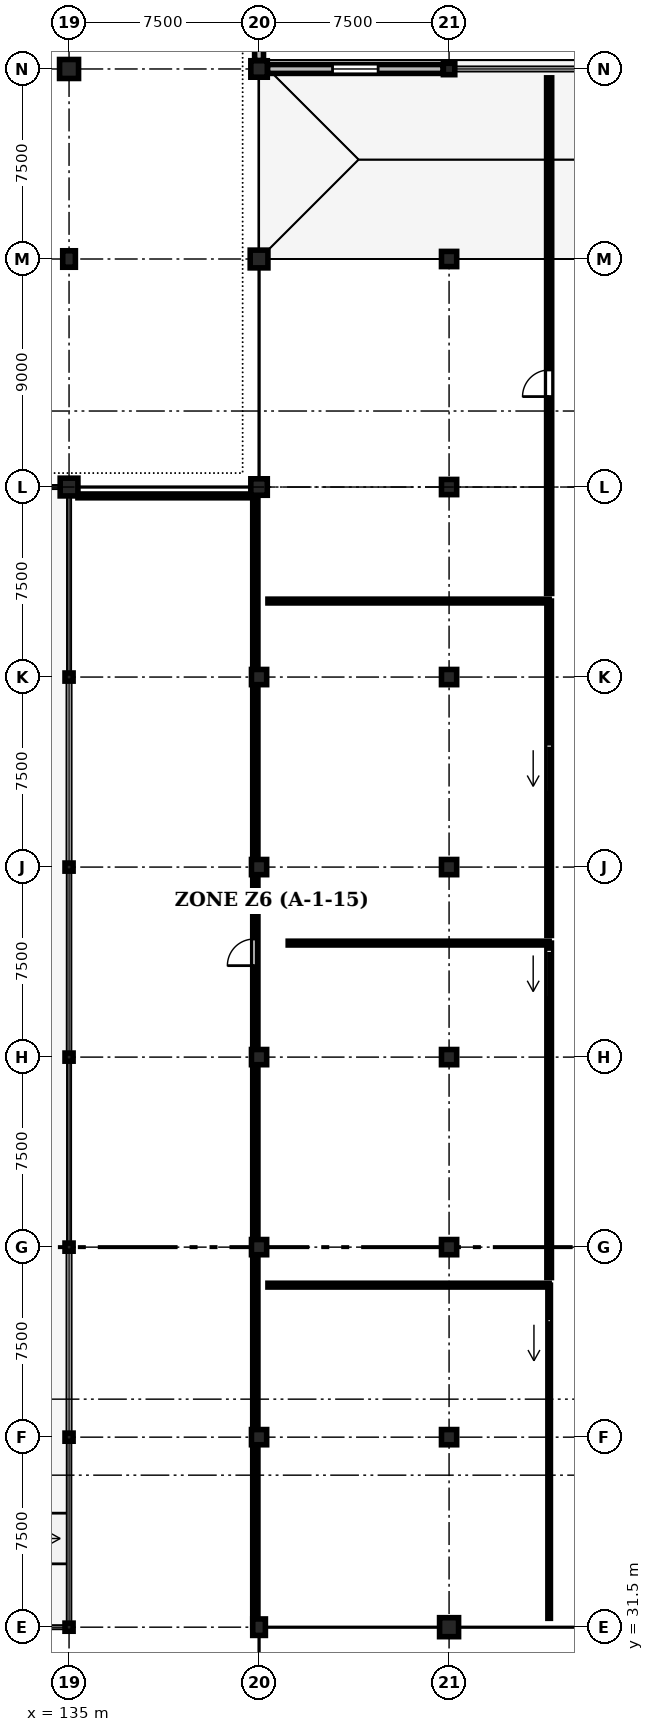
"""IFC4 building model, lengths in metres.
Left out: names, types, materials, properties, quantities, classifications, styles, units other than length and angle.
Written with IfcOpenShell. Run it as: python <this file> out.ifc"""

import sys

from ifc_helpers import new_model, si_unit, direction, frame, frame_2d, origin, origin_2d, place, context, subcontext, project, spatial, rectangle, circle, extrude, element, fill, save


model = new_model("IFC4")
c1 = context("Model", 3, precision=1e-05, world=origin(), true_north=direction((0.0, 1.0)))
c2 = subcontext(c1, "Body", "Model", "MODEL_VIEW")
j1 = project(units=[si_unit("LENGTHUNIT", "METRE"), si_unit("PLANEANGLEUNIT", "RADIAN")], contexts=[c1])
p1 = place(None, origin())
s1 = spatial("IfcSite", under=j1, at=p1, CompositionType="ELEMENT")
p2 = place(p1, origin())
s2 = spatial("IfcBuilding", under=s1, at=p2, CompositionType="ELEMENT")
p3 = place(p2, origin())
s3 = spatial("IfcBuildingStorey", under=s2, at=p3, CompositionType="ELEMENT", Elevation=0.0)
for number, where, z_axis, x_axis in (
    (1, (135.0, 31.5, 0.0), (0.0, 0.0, 1.0), (1.0, 0.0, 0.0)),
    (2, (135.0, 39.0, 0.0), (0.0, 0.0, 1.0), (1.0, 0.0, 0.0)),
    (3, (135.0, 46.5, 0.0), (0.0, 0.0, 1.0), (1.0, 0.0, 0.0)),
    (4, (135.0, 54.0, 0.0), (0.0, 0.0, 1.0), (1.0, 0.0, 0.0)),
    (5, (135.0, 61.5, 0.0), (0.0, 0.0, 1.0), (1.0, 0.0, 0.0)),
    (6, (135.0, 69.0, 0.0), (0.0, 0.0, 1.0), (1.0, 0.0, 0.0)),
):
    element("IfcColumn", number, at=place(p3, frame(where, z_axis=z_axis, x_axis=x_axis)), inside=s3, PredefinedType="COLUMN", context=c2, shape_type="SweptSolid", body=[
        extrude(rectangle(XDim=0.32, YDim=0.32, at=origin_2d()), origin(), (0.0, 0.0, 1.0), 4.8),
    ])
p4 = place(p3, frame((135.0, 76.5, 0.0), z_axis=(0.0, 0.0, 1.0), x_axis=(1.0, 0.0, 0.0)))
e7 = element("IfcColumn", 7, at=p4, inside=s3, PredefinedType="COLUMN", context=c2, shape_type="SweptSolid", body=[
    extrude(rectangle(XDim=0.7, YDim=0.7, at=origin_2d()), origin(), (0.0, 0.0, 1.0), 4.8),
])
p5 = place(p3, frame((135.0, 85.5, 0.0), z_axis=(0.0, 0.0, 1.0), x_axis=(1.0, 0.0, 0.0)))
e8 = element("IfcColumn", 8, at=p5, inside=s3, PredefinedType="COLUMN", context=c2, shape_type="SweptSolid", body=[
    extrude(rectangle(XDim=0.5, YDim=0.65, at=origin_2d()), origin(), (0.0, 0.0, 1.0), 4.8),
])
p6 = place(p3, frame((135.0, 93.0, 0.0), z_axis=(0.0, 0.0, 1.0), x_axis=(1.0, 0.0, 0.0)))
e9 = element("IfcColumn", 9, at=p6, inside=s3, PredefinedType="COLUMN", context=c2, shape_type="SweptSolid", body=[
    extrude(rectangle(XDim=0.75, YDim=0.75, at=origin_2d()), origin(), (0.0, 0.0, 1.0), 4.8),
])
p7 = place(p3, frame((142.5, 31.5, 0.0), z_axis=(0.0, 0.0, 1.0), x_axis=(1.0, 0.0, 0.0)))
e10 = element("IfcColumn", 10, at=p7, inside=s3, PredefinedType="COLUMN", context=c2, shape_type="SweptSolid", body=[
    extrude(rectangle(XDim=0.5, YDim=0.65, at=origin_2d()), origin(), (0.0, 0.0, 1.0), 4.8),
])
p8 = place(p3, frame((142.5, 39.0, 0.0), z_axis=(0.0, 0.0, 1.0), x_axis=(1.0, 0.0, 0.0)))
e11 = element("IfcColumn", 11, at=p8, inside=s3, PredefinedType="COLUMN", context=c2, shape_type="SweptSolid", body=[
    extrude(circle(Radius=0.3, at=origin_2d()), origin(), (0.0, 0.0, 1.0), 4.8),
])
for number, where, z_axis, x_axis in (
    (12, (142.5, 46.5, 0.0), (0.0, 0.0, 1.0), (1.0, 0.0, 0.0)),
    (13, (142.5, 54.0, 0.0), (0.0, 0.0, 1.0), (1.0, 0.0, 0.0)),
):
    element("IfcColumn", number, at=place(p3, frame(where, z_axis=z_axis, x_axis=x_axis)), inside=s3, PredefinedType="COLUMN", context=c2, shape_type="SweptSolid", body=[
        extrude(rectangle(XDim=0.6, YDim=0.6, at=origin_2d()), origin(), (0.0, 0.0, 1.0), 4.8),
    ])
p9 = place(p3, frame((142.5, 61.5, 0.0), z_axis=(0.0, 0.0, 1.0), x_axis=(1.0, 0.0, 0.0)))
e14 = element("IfcColumn", 14, at=p9, inside=s3, PredefinedType="COLUMN", context=c2, shape_type="SweptSolid", body=[
    extrude(circle(Radius=0.3, at=origin_2d()), origin(), (0.0, 0.0, 1.0), 4.8),
])
p10 = place(p3, frame((142.5, 69.0, 0.0), z_axis=(0.0, 0.0, 1.0), x_axis=(1.0, 0.0, 0.0)))
e15 = element("IfcColumn", 15, at=p10, inside=s3, PredefinedType="COLUMN", context=c2, shape_type="SweptSolid", body=[
    extrude(rectangle(XDim=0.6, YDim=0.6, at=origin_2d()), origin(), (0.0, 0.0, 1.0), 4.8),
])
p11 = place(p3, frame((142.5, 76.5, 0.0), z_axis=(0.0, 0.0, 1.0), x_axis=(1.0, 0.0, 0.0)))
e16 = element("IfcColumn", 16, at=p11, inside=s3, PredefinedType="COLUMN", context=c2, shape_type="SweptSolid", body=[
    extrude(rectangle(XDim=0.65, YDim=0.65, at=origin_2d()), origin(), (0.0, 0.0, 1.0), 4.8),
])
p12 = place(p3, frame((142.5, 85.5, 0.0), z_axis=(0.0, 0.0, 1.0), x_axis=(1.0, 0.0, 0.0)))
e17 = element("IfcColumn", 17, at=p12, inside=s3, PredefinedType="COLUMN", context=c2, shape_type="SweptSolid", body=[
    extrude(rectangle(XDim=0.7, YDim=0.7, at=origin_2d()), origin(), (0.0, 0.0, 1.0), 4.8),
])
p13 = place(p3, frame((142.5, 93.0, 0.0), z_axis=(0.0, 0.0, 1.0), x_axis=(1.0, 0.0, 0.0)))
e18 = element("IfcColumn", 18, at=p13, inside=s3, PredefinedType="COLUMN", context=c2, shape_type="SweptSolid", body=[
    extrude(rectangle(XDim=0.65, YDim=0.65, at=origin_2d()), origin(), (0.0, 0.0, 1.0), 4.8),
])
p14 = place(p3, frame((150.0, 31.5, 0.0), z_axis=(0.0, 0.0, 1.0), x_axis=(1.0, 0.0, 0.0)))
e19 = element("IfcColumn", 19, at=p14, inside=s3, PredefinedType="COLUMN", context=c2, shape_type="SweptSolid", body=[
    extrude(rectangle(XDim=0.75, YDim=0.75, at=origin_2d()), origin(), (0.0, 0.0, 1.0), 4.8),
])
for number, where, z_axis, x_axis in (
    (20, (150.0, 39.0, 0.0), (0.0, 0.0, 1.0), (1.0, 0.0, 0.0)),
    (21, (150.0, 46.5, 0.0), (0.0, 0.0, 1.0), (1.0, 0.0, 0.0)),
):
    element("IfcColumn", number, at=place(p3, frame(where, z_axis=z_axis, x_axis=x_axis)), inside=s3, PredefinedType="COLUMN", context=c2, shape_type="SweptSolid", body=[
        extrude(rectangle(XDim=0.6, YDim=0.6, at=origin_2d()), origin(), (0.0, 0.0, 1.0), 4.8),
    ])
p15 = place(p3, frame((150.0, 54.0, 0.0), z_axis=(0.0, 0.0, 1.0), x_axis=(1.0, 0.0, 0.0)))
e22 = element("IfcColumn", 22, at=p15, inside=s3, PredefinedType="COLUMN", context=c2, shape_type="SweptSolid", body=[
    extrude(circle(Radius=0.3, at=origin_2d()), origin(), (0.0, 0.0, 1.0), 4.8),
])
for number, where, z_axis, x_axis in (
    (23, (150.0, 61.5, 0.0), (0.0, 0.0, 1.0), (1.0, 0.0, 0.0)),
    (24, (150.0, 69.0, 0.0), (0.0, 0.0, 1.0), (1.0, 0.0, 0.0)),
):
    element("IfcColumn", number, at=place(p3, frame(where, z_axis=z_axis, x_axis=x_axis)), inside=s3, PredefinedType="COLUMN", context=c2, shape_type="SweptSolid", body=[
        extrude(rectangle(XDim=0.6, YDim=0.6, at=origin_2d()), origin(), (0.0, 0.0, 1.0), 4.8),
    ])
p16 = place(p3, frame((150.0, 76.5, 0.0), z_axis=(0.0, 0.0, 1.0), x_axis=(1.0, 0.0, 0.0)))
e25 = element("IfcColumn", 25, at=p16, inside=s3, PredefinedType="COLUMN", context=c2, shape_type="SweptSolid", body=[
    extrude(circle(Radius=0.3, at=origin_2d()), origin(), (0.0, 0.0, 1.0), 4.8),
])
p17 = place(p3, frame((150.0, 85.5, 0.0), z_axis=(0.0, 0.0, 1.0), x_axis=(1.0, 0.0, 0.0)))
e26 = element("IfcColumn", 26, at=p17, inside=s3, PredefinedType="COLUMN", context=c2, shape_type="SweptSolid", body=[
    extrude(rectangle(XDim=0.6, YDim=0.6, at=origin_2d()), origin(), (0.0, 0.0, 1.0), 4.8),
])
p18 = place(p3, frame((150.0, 93.0, 0.0), z_axis=(0.0, 0.0, 1.0), x_axis=(1.0, 0.0, 0.0)))
e27 = element("IfcColumn", 27, at=p18, inside=s3, PredefinedType="COLUMN", context=c2, shape_type="SweptSolid", body=[
    extrude(rectangle(XDim=0.45, YDim=0.45, at=origin_2d()), origin(), (0.0, 0.0, 1.0), 4.8),
])
p19 = place(p3, frame((142.5, 100.14, 0.0), z_axis=(0.0, 0.0, 1.0), x_axis=(0.0, -1.0, 0.0)))
e28 = element("IfcWall", 28, at=p19, inside=s3, PredefinedType="STANDARD", context=c2, shape_type="SweptSolid", body=[
    extrude(rectangle(XDim=6.805, YDim=0.35, at=frame_2d((3.402, 0.0))), origin(), (0.0, 0.0, 1.0), 3.9),
])
p20 = place(p19, frame((2.502, 0.0, 0.9)))
e29 = element("IfcOpeningElement", 29, at=p20, cuts=e28, PredefinedType="OPENING", context=c2, shape_type="SweptSolid", body=[
    extrude(rectangle(XDim=1.8, YDim=1.8, at=frame_2d((0.9, 0.9))), frame((0.0, 0.185, 0.0), z_axis=(0.0, -1.0, 0.0), x_axis=(1.0, 0.0, 0.0)), (0.0, 0.0, 1.0), 0.37),
])
p21 = place(p3, frame((142.835, 93.0, 0.0), z_axis=(0.0, 0.0, 1.0), x_axis=(1.0, 0.0, 0.0)))
e30 = element("IfcWall", 30, at=p21, inside=s3, PredefinedType="STANDARD", context=c2, shape_type="SweptSolid", body=[
    extrude(rectangle(XDim=6.93, YDim=0.35, at=frame_2d((3.465, 0.0))), origin(), (0.0, 0.0, 1.0), 4.5),
])
p22 = place(p21, frame((2.565, 0.0, 0.9)))
e31 = element("IfcOpeningElement", 31, at=p22, cuts=e30, PredefinedType="OPENING", context=c2, shape_type="SweptSolid", body=[
    extrude(rectangle(XDim=1.8, YDim=1.8, at=frame_2d((0.9, 0.9))), frame((0.0, 0.185, 0.0), z_axis=(0.0, -1.0, 0.0), x_axis=(1.0, 0.0, 0.0)), (0.0, 0.0, 1.0), 0.37),
])
p23 = place(p3, frame((142.3, 31.5, 0.0), z_axis=(0.0, 0.0, 1.0), x_axis=(0.0, 1.0, 0.0)))
e32 = element("IfcWall", 32, at=p23, inside=s3, PredefinedType="PARTITIONING", context=c2, shape_type="SweptSolid", body=[
    extrude(rectangle(XDim=44.65, YDim=0.1, at=frame_2d((22.325, 0.0))), origin(), (0.0, 0.0, 1.0), 3.935),
])
p24 = place(p23, frame((26.11, 0.0, 0.0)))
e33 = element("IfcOpeningElement", 33, at=p24, cuts=e32, PredefinedType="OPENING", context=c2, shape_type="SweptSolid", body=[
    extrude(rectangle(XDim=1.05, YDim=2.2, at=frame_2d((0.525, 1.1))), frame((0.0, 0.06, 0.0), z_axis=(0.0, -1.0, 0.0), x_axis=(1.0, 0.0, 0.0)), (0.0, 0.0, 1.0), 0.12),
])
p25 = place(p3, frame((153.95, 31.85, 0.0), z_axis=(0.0, 0.0, 1.0), x_axis=(0.0, 1.0, 0.0)))
e34 = element("IfcWall", 34, at=p25, inside=s3, PredefinedType="PARTITIONING", context=c2, shape_type="SweptSolid", body=[
    extrude(rectangle(XDim=13.15, YDim=0.1, at=frame_2d((6.575, 0.0))), origin(), (0.0, 0.0, 1.0), 4.485),
])
p26 = place(p25, frame((9.925, 0.0, 0.0)))
e35 = element("IfcOpeningElement", 35, at=p26, cuts=e34, PredefinedType="OPENING", context=c2, shape_type="SweptSolid", body=[
    extrude(rectangle(XDim=1.9, YDim=2.45, at=frame_2d((0.95, 1.225))), frame((0.0, 0.06, 0.0), z_axis=(0.0, -1.0, 0.0), x_axis=(1.0, 0.0, 0.0)), (0.0, 0.0, 1.0), 0.12),
])
p27 = place(p3, frame((153.95, 45.3, 0.0), z_axis=(0.0, 0.0, 1.0), x_axis=(0.0, 1.0, 0.0)))
e36 = element("IfcWall", 36, at=p27, inside=s3, PredefinedType="PARTITIONING", context=c2, shape_type="SweptSolid", body=[
    extrude(rectangle(XDim=13.2, YDim=0.18, at=frame_2d((6.6, 0.0))), origin(), (0.0, 0.0, 1.0), 4.485),
])
p28 = place(p27, frame((11.05, 0.0, 0.0)))
e37 = element("IfcOpeningElement", 37, at=p28, cuts=e36, PredefinedType="OPENING", context=c2, shape_type="SweptSolid", body=[
    extrude(rectangle(XDim=1.9, YDim=2.45, at=frame_2d((0.95, 1.225))), frame((0.0, 0.1, 0.0), z_axis=(0.0, -1.0, 0.0), x_axis=(1.0, 0.0, 0.0)), (0.0, 0.0, 1.0), 0.2),
])
p29 = place(p3, frame((153.95, 58.8, 0.0), z_axis=(0.0, 0.0, 1.0), x_axis=(0.0, 1.0, 0.0)))
e38 = element("IfcWall", 38, at=p29, inside=s3, PredefinedType="PARTITIONING", context=c2, shape_type="SweptSolid", body=[
    extrude(rectangle(XDim=13.2, YDim=0.18, at=frame_2d((6.6, 0.0))), origin(), (0.0, 0.0, 1.0), 4.485),
])
p30 = place(p29, frame((5.65, 0.0, 0.0)))
e39 = element("IfcOpeningElement", 39, at=p30, cuts=e38, PredefinedType="OPENING", context=c2, shape_type="SweptSolid", body=[
    extrude(rectangle(XDim=1.9, YDim=2.45, at=frame_2d((0.95, 1.225))), frame((0.0, 0.1, 0.0), z_axis=(0.0, -1.0, 0.0), x_axis=(1.0, 0.0, 0.0)), (0.0, 0.0, 1.0), 0.2),
])
p31 = place(p3, frame((153.95, 72.3, 0.0), z_axis=(0.0, 0.0, 1.0), x_axis=(0.0, 1.0, 0.0)))
e40 = element("IfcWall", 40, at=p31, inside=s3, PredefinedType="STANDARD", context=c2, shape_type="SweptSolid", body=[
    extrude(rectangle(XDim=20.35, YDim=0.2, at=frame_2d((10.175, 0.0))), origin(), (0.0, 0.0, 1.0), 4.085),
])
p32 = place(p31, frame((7.77, 0.0, 0.0)))
e41 = element("IfcOpeningElement", 41, at=p32, cuts=e40, PredefinedType="OPENING", context=c2, shape_type="SweptSolid", body=[
    extrude(rectangle(XDim=1.05, YDim=2.2, at=frame_2d((0.525, 1.1))), frame((0.0, 0.11, 0.0), z_axis=(0.0, -1.0, 0.0), x_axis=(1.0, 0.0, 0.0)), (0.0, 0.0, 1.0), 0.22),
])
p33 = place(p3, frame((135.35, 76.15, 0.0), z_axis=(0.0, 0.0, 1.0), x_axis=(1.0, 0.0, 0.0)))
e42 = element("IfcWall", 42, at=p33, inside=s3, PredefinedType="PARTITIONING", context=c2, shape_type="SweptSolid", body=[
    extrude(rectangle(XDim=6.95, YDim=0.15, at=frame_2d((3.475, 0.0))), origin(), (0.0, 0.0, 1.0), 3.835),
])
p34 = place(p3, frame((142.85, 45.0, 0.0), z_axis=(0.0, 0.0, 1.0), x_axis=(1.0, 0.0, 0.0)))
e43 = element("IfcWall", 43, at=p34, inside=s3, PredefinedType="PARTITIONING", context=c2, shape_type="SweptSolid", body=[
    extrude(rectangle(XDim=11.1, YDim=0.15, at=frame_2d((5.55, 0.0))), origin(), (0.0, 0.0, 1.0), 4.485),
])
p35 = place(p3, frame((143.65, 58.5, 0.0), z_axis=(0.0, 0.0, 1.0), x_axis=(1.0, 0.0, 0.0)))
e44 = element("IfcWall", 44, at=p35, inside=s3, PredefinedType="PARTITIONING", context=c2, shape_type="SweptSolid", body=[
    extrude(rectangle(XDim=10.3, YDim=0.15, at=frame_2d((5.15, 0.0))), origin(), (0.0, 0.0, 1.0), 4.485),
])
p36 = place(p3, frame((142.85, 72.0, 0.0), z_axis=(0.0, 0.0, 1.0), x_axis=(1.0, 0.0, 0.0)))
e45 = element("IfcWall", 45, at=p36, inside=s3, PredefinedType="PARTITIONING", context=c2, shape_type="SweptSolid", body=[
    extrude(rectangle(XDim=11.1, YDim=0.15, at=frame_2d((5.55, 0.0))), origin(), (0.0, 0.0, 1.0), 4.485),
])
p37 = place(p22, origin())
e46 = element("IfcWindow", 46, at=p37, inside=s3, PartitioningType="SINGLE_PANEL", PredefinedType="WINDOW", context=c2, shape_type="SweptSolid", body=[
    extrude(rectangle(XDim=1.8, YDim=1.8, at=frame_2d((0.9, 0.9))), frame((0.0, 0.03, 0.0), z_axis=(0.0, -1.0, 0.0), x_axis=(1.0, 0.0, 0.0)), (0.0, 0.0, 1.0), 0.06),
])
fill(e31, e46)
p38 = place(p24, origin())
e47 = element("IfcDoor", 47, at=p38, inside=s3, OperationType="SINGLE_SWING_LEFT", PredefinedType="DOOR", context=c2, shape_type="SweptSolid", body=[
    extrude(rectangle(XDim=1.05, YDim=2.2, at=frame_2d((0.525, 1.1))), frame((0.0, 0.025, 0.0), z_axis=(0.0, -1.0, 0.0), x_axis=(1.0, 0.0, 0.0)), (0.0, 0.0, 1.0), 0.05),
])
fill(e33, e47)
p39 = place(p26, origin())
e48 = element("IfcDoor", 48, at=p39, inside=s3, OperationType="DOUBLE_DOOR_SLIDING", PredefinedType="DOOR", context=c2, shape_type="SweptSolid", body=[
    extrude(rectangle(XDim=1.9, YDim=2.45, at=frame_2d((0.95, 1.225))), frame((0.0, 0.025, 0.0), z_axis=(0.0, -1.0, 0.0), x_axis=(1.0, 0.0, 0.0)), (0.0, 0.0, 1.0), 0.05),
])
fill(e35, e48)
p40 = place(p28, origin())
e49 = element("IfcDoor", 49, at=p40, inside=s3, OperationType="DOUBLE_DOOR_SLIDING", PredefinedType="DOOR", context=c2, shape_type="SweptSolid", body=[
    extrude(rectangle(XDim=1.9, YDim=2.45, at=frame_2d((0.95, 1.225))), frame((0.0, 0.025, 0.0), z_axis=(0.0, -1.0, 0.0), x_axis=(1.0, 0.0, 0.0)), (0.0, 0.0, 1.0), 0.05),
])
fill(e37, e49)
p41 = place(p30, origin())
e50 = element("IfcDoor", 50, at=p41, inside=s3, OperationType="DOUBLE_DOOR_SLIDING", PredefinedType="DOOR", context=c2, shape_type="SweptSolid", body=[
    extrude(rectangle(XDim=1.9, YDim=2.45, at=frame_2d((0.95, 1.225))), frame((0.0, 0.025, 0.0), z_axis=(0.0, -1.0, 0.0), x_axis=(1.0, 0.0, 0.0)), (0.0, 0.0, 1.0), 0.05),
])
fill(e39, e50)
p42 = place(p32, origin())
e51 = element("IfcDoor", 51, at=p42, inside=s3, OperationType="SINGLE_SWING_LEFT", PredefinedType="DOOR", context=c2, shape_type="SweptSolid", body=[
    extrude(rectangle(XDim=1.05, YDim=2.2, at=frame_2d((0.525, 1.1))), frame((0.0, 0.025, 0.0), z_axis=(0.0, -1.0, 0.0), x_axis=(1.0, 0.0, 0.0)), (0.0, 0.0, 1.0), 0.05),
])
fill(e41, e51)
save(model, sys.argv[1])
